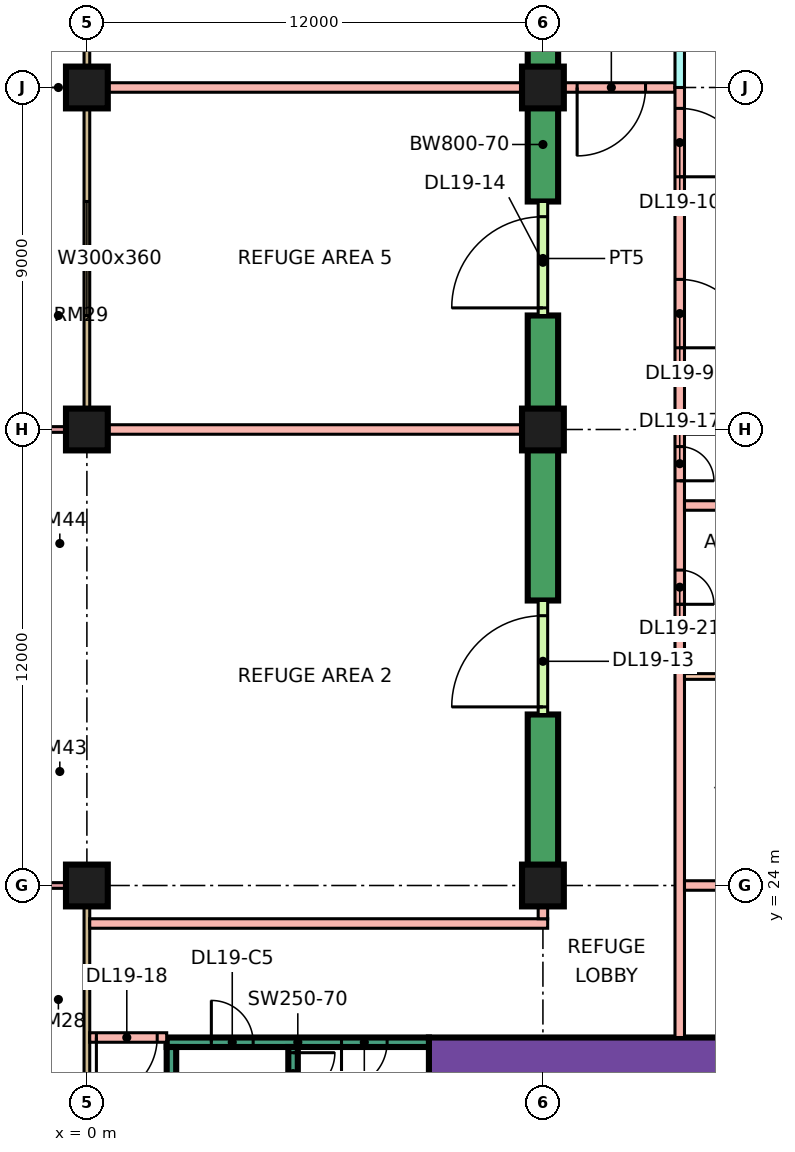
"""IFC4 building model, lengths in metres.
Left out: names, types, materials, properties, quantities, classifications, styles, units other than length and angle.
Written with IfcOpenShell. Run it as: python <this file> out.ifc"""

import sys

from ifc_helpers import new_model, si_unit, direction, frame, frame_2d, origin, origin_2d, place, context, subcontext, project, spatial, rectangle, extrude, element, fill, save


model = new_model("IFC4")
c1 = context("Model", 3, precision=1e-05, world=origin(), true_north=direction((0.0, 1.0)))
c2 = subcontext(c1, "Body", "Model", "MODEL_VIEW")
j1 = project(units=[si_unit("LENGTHUNIT", "METRE"), si_unit("PLANEANGLEUNIT", "RADIAN")], contexts=[c1])
p1 = place(None, origin())
s1 = spatial("IfcSite", under=j1, at=p1, CompositionType="ELEMENT")
p2 = place(p1, origin())
s2 = spatial("IfcBuilding", under=s1, at=p2, CompositionType="ELEMENT")
p3 = place(p2, frame((0.0, 0.0, 86.4)))
s3 = spatial("IfcBuildingStorey", under=s2, at=p3, CompositionType="ELEMENT", Elevation=86.4)
p4 = place(p3, frame((0.0, 24.0, 0.0), z_axis=(0.0, 0.0, 1.0), x_axis=(1.0, 0.0, 0.0)))
e1 = element("IfcColumn", 1, at=p4, inside=s3, PredefinedType="COLUMN", context=c2, shape_type="SweptSolid", body=[
    extrude(rectangle(XDim=1.1, YDim=1.1, at=origin_2d()), origin(), (0.0, 0.0, 1.0), 5.5),
])
p5 = place(p3, frame((0.0, 36.0, 0.0), z_axis=(0.0, 0.0, 1.0), x_axis=(1.0, 0.0, 0.0)))
e2 = element("IfcColumn", 2, at=p5, inside=s3, PredefinedType="COLUMN", context=c2, shape_type="SweptSolid", body=[
    extrude(rectangle(XDim=1.1, YDim=1.1, at=origin_2d()), origin(), (0.0, 0.0, 1.0), 5.5),
])
for number, where, z_axis, x_axis in (
    (3, (0.0, 45.0, 0.0), (0.0, 0.0, 1.0), (1.0, 0.0, 0.0)),
    (4, (12.0, 24.0, 0.0), (0.0, 0.0, 1.0), (1.0, 0.0, 0.0)),
    (5, (12.0, 36.0, 0.0), (0.0, 0.0, 1.0), (1.0, 0.0, 0.0)),
    (6, (12.0, 45.0, 0.0), (0.0, 0.0, 1.0), (1.0, 0.0, 0.0)),
):
    element("IfcColumn", number, at=place(p3, frame(where, z_axis=z_axis, x_axis=x_axis)), inside=s3, PredefinedType="COLUMN", context=c2, shape_type="SweptSolid", body=[
        extrude(rectangle(XDim=1.1, YDim=1.1, at=origin_2d()), origin(), (0.0, 0.0, 1.0), 5.5),
    ])
p6 = place(p3, frame((9.0, 19.45, 0.0), z_axis=(0.0, 0.0, 1.0), x_axis=(1.0, 0.0, 0.0)))
e7 = element("IfcWall", 7, at=p6, inside=s3, PredefinedType="SHEAR", context=c2, shape_type="SweptSolid", body=[
    extrude(rectangle(XDim=25.0, YDim=1.1, at=frame_2d((12.5, 0.0))), origin(), (0.0, 0.0, 1.0), 5.5),
])
p7 = place(p6, frame((19.1, 0.0, 0.0)))
e8 = element("IfcOpeningElement", 8, at=p7, cuts=e7, PredefinedType="OPENING", context=c2, shape_type="SweptSolid", body=[
    extrude(rectangle(XDim=1.8, YDim=2.4, at=frame_2d((0.9, 1.2))), frame((0.0, 0.56, 0.0), z_axis=(0.0, -1.0, 0.0), x_axis=(1.0, 0.0, 0.0)), (0.0, 0.0, 1.0), 1.12),
])
p8 = place(p3, frame((2.1, 19.875, 0.0), z_axis=(0.0, 0.0, 1.0), x_axis=(1.0, 0.0, 0.0)))
e9 = element("IfcWall", 9, at=p8, inside=s3, PredefinedType="SHEAR", context=c2, shape_type="SweptSolid", body=[
    extrude(rectangle(XDim=6.9, YDim=0.25, at=frame_2d((3.45, 0.0))), origin(), (0.0, 0.0, 1.0), 5.5),
])
p9 = place(p8, frame((1.175, 0.0, 0.0)))
e10 = element("IfcOpeningElement", 10, at=p9, cuts=e9, PredefinedType="OPENING", context=c2, shape_type="SweptSolid", body=[
    extrude(rectangle(XDim=1.1, YDim=2.2, at=frame_2d((0.55, 1.1))), frame((0.0, 0.135, 0.0), z_axis=(0.0, -1.0, 0.0), x_axis=(1.0, 0.0, 0.0)), (0.0, 0.0, 1.0), 0.27),
])
p10 = place(p8, frame((4.6, 0.0, 0.0)))
e11 = element("IfcOpeningElement", 11, at=p10, cuts=e9, PredefinedType="OPENING", context=c2, shape_type="SweptSolid", body=[
    extrude(rectangle(XDim=1.2, YDim=2.2, at=frame_2d((0.6, 1.1))), frame((0.0, 0.135, 0.0), z_axis=(0.0, -1.0, 0.0), x_axis=(1.0, 0.0, 0.0)), (0.0, 0.0, 1.0), 0.27),
])
p11 = place(p3, frame((2.225, 13.25, 0.0), z_axis=(0.0, 0.0, 1.0), x_axis=(0.0, 1.0, 0.0)))
e12 = element("IfcWall", 12, at=p11, inside=s3, PredefinedType="SHEAR", context=c2, shape_type="SweptSolid", body=[
    extrude(rectangle(XDim=6.5, YDim=0.25, at=frame_2d((3.25, 0.0))), origin(), (0.0, 0.0, 1.0), 5.5),
])
p12 = place(p3, frame((5.425, 13.25, 0.0), z_axis=(0.0, 0.0, 1.0), x_axis=(0.0, 1.0, 0.0)))
e13 = element("IfcWall", 13, at=p12, inside=s3, PredefinedType="SHEAR", context=c2, shape_type="SweptSolid", body=[
    extrude(rectangle(XDim=6.5, YDim=0.25, at=frame_2d((3.25, 0.0))), origin(), (0.0, 0.0, 1.0), 5.5),
])
p13 = place(p12, frame((5.25, 0.0, 0.0)))
e14 = element("IfcOpeningElement", 14, at=p13, cuts=e13, PredefinedType="OPENING", context=c2, shape_type="SweptSolid", body=[
    extrude(rectangle(XDim=1.1, YDim=2.2, at=frame_2d((0.55, 1.1))), frame((0.0, 0.135, 0.0), z_axis=(0.0, -1.0, 0.0), x_axis=(1.0, 0.0, 0.0)), (0.0, 0.0, 1.0), 0.27),
])
for number, where, z_axis, x_axis in (
    (15, (12.0, 24.0, 0.0), (0.0, 0.0, 1.0), (0.0, 1.0, 0.0)),
    (16, (12.0, 31.5, 0.0), (0.0, 0.0, 1.0), (0.0, 1.0, 0.0)),
):
    element("IfcWall", number, at=place(p3, frame(where, z_axis=z_axis, x_axis=x_axis)), inside=s3, PredefinedType="SHEAR", context=c2, shape_type="SweptSolid", body=[
        extrude(rectangle(XDim=4.5, YDim=0.8, at=frame_2d((2.25, 0.0))), origin(), (0.0, 0.0, 1.0), 5.1),
    ])
for number, where, z_axis, x_axis in (
    (17, (12.0, 36.0, 0.0), (0.0, 0.0, 1.0), (0.0, 1.0, 0.0)),
    (18, (12.0, 42.0, 0.0), (0.0, 0.0, 1.0), (0.0, 1.0, 0.0)),
    (19, (12.0, 45.0, 0.0), (0.0, 0.0, 1.0), (0.0, 1.0, 0.0)),
):
    element("IfcWall", number, at=place(p3, frame(where, z_axis=z_axis, x_axis=x_axis)), inside=s3, PredefinedType="SHEAR", context=c2, shape_type="SweptSolid", body=[
        extrude(rectangle(XDim=3.0, YDim=0.8, at=frame_2d((1.5, 0.0))), origin(), (0.0, 0.0, 1.0), 5.1),
    ])
p14 = place(p3, frame((0.0, 47.925, 0.0), z_axis=(0.0, 0.0, 1.0), x_axis=(0.0, -1.0, 0.0)))
e20 = element("IfcWall", 20, at=p14, inside=s3, PredefinedType="SOLIDWALL", context=c2, shape_type="SweptSolid", body=[
    extrude(rectangle(XDim=11.85, YDim=0.15, at=frame_2d((5.925, 0.0))), origin(), (0.0, 0.0, 1.0), 5.1),
])
p15 = place(p14, frame((5.925, 0.0, 0.45)))
e21 = element("IfcOpeningElement", 21, at=p15, cuts=e20, PredefinedType="OPENING", context=c2, shape_type="SweptSolid", body=[
    extrude(rectangle(XDim=3.0, YDim=3.6, at=frame_2d((1.5, 1.8))), frame((0.0, 0.085, 0.0), z_axis=(0.0, -1.0, 0.0), x_axis=(1.0, 0.0, 0.0)), (0.0, 0.0, 1.0), 0.17),
])
p16 = place(p3, frame((-1.5, 36.0, 0.0), z_axis=(0.0, 0.0, 1.0), x_axis=(1.0, 0.0, 0.0)))
e22 = element("IfcWall", 22, at=p16, inside=s3, PredefinedType="SOLIDWALL", context=c2, shape_type="SweptSolid", body=[
    extrude(rectangle(XDim=1.5, YDim=0.15, at=frame_2d((0.75, 0.0))), origin(), (0.0, 0.0, 1.0), 5.1),
])
p17 = place(p3, frame((0.0, 23.925, 0.0), z_axis=(0.0, 0.0, 1.0), x_axis=(0.0, -1.0, 0.0)))
e23 = element("IfcWall", 23, at=p17, inside=s3, PredefinedType="SOLIDWALL", context=c2, shape_type="SweptSolid", body=[
    extrude(rectangle(XDim=11.35, YDim=0.15, at=frame_2d((5.675, 0.0))), origin(), (0.0, 0.0, 1.0), 5.1),
])
p18 = place(p3, frame((-1.5, 24.0, 0.0), z_axis=(0.0, 0.0, 1.0), x_axis=(1.0, 0.0, 0.0)))
e24 = element("IfcWall", 24, at=p18, inside=s3, PredefinedType="SOLIDWALL", context=c2, shape_type="SweptSolid", body=[
    extrude(rectangle(XDim=1.5, YDim=0.15, at=frame_2d((0.75, 0.0))), origin(), (0.0, 0.0, 1.0), 5.1),
])
e25 = element("IfcWall", 25, at=p5, inside=s3, PredefinedType="PARTITIONING", context=c2, shape_type="SweptSolid", body=[
    extrude(rectangle(XDim=11.601, YDim=0.25, at=frame_2d((5.801, 0.0))), origin(), (0.0, 0.0, 1.0), 5.1),
])
p19 = place(p3, frame((0.074, 20.0, 0.0), z_axis=(0.0, 0.0, 1.0), x_axis=(1.0, 0.0, 0.0)))
e26 = element("IfcWall", 26, at=p19, inside=s3, PredefinedType="PARTITIONING", context=c2, shape_type="SweptSolid", body=[
    extrude(rectangle(XDim=2.026, YDim=0.25, at=frame_2d((1.013, 0.0))), origin(), (0.0, 0.0, 1.0), 5.1),
])
p20 = place(p19, frame((0.176, 0.0, 0.0)))
e27 = element("IfcOpeningElement", 27, at=p20, cuts=e26, PredefinedType="OPENING", context=c2, shape_type="SweptSolid", body=[
    extrude(rectangle(XDim=1.6, YDim=2.1, at=frame_2d((0.8, 1.05))), frame((0.0, 0.135, 0.0), z_axis=(0.0, -1.0, 0.0), x_axis=(1.0, 0.0, 0.0)), (0.0, 0.0, 1.0), 0.27),
])
p21 = place(p3, frame((0.074, 23.0, 0.0), z_axis=(0.0, 0.0, 1.0), x_axis=(1.0, 0.0, 0.0)))
e28 = element("IfcWall", 28, at=p21, inside=s3, PredefinedType="PARTITIONING", context=c2, shape_type="SweptSolid", body=[
    extrude(rectangle(XDim=12.051, YDim=0.25, at=frame_2d((6.025, 0.0))), origin(), (0.0, 0.0, 1.0), 5.1),
])
p22 = place(p3, frame((0.074, 45.0, 0.0), z_axis=(0.0, 0.0, 1.0), x_axis=(1.0, 0.0, 0.0)))
e29 = element("IfcWall", 29, at=p22, inside=s3, PredefinedType="PARTITIONING", context=c2, shape_type="SweptSolid", body=[
    extrude(rectangle(XDim=11.527, YDim=0.25, at=frame_2d((5.764, 0.0))), origin(), (0.0, 0.0, 1.0), 5.1),
])
p23 = place(p3, frame((12.0, 23.125, 0.0), z_axis=(0.0, 0.0, 1.0), x_axis=(0.0, 1.0, 0.0)))
e30 = element("IfcWall", 30, at=p23, inside=s3, PredefinedType="PARTITIONING", context=c2, shape_type="SweptSolid", body=[
    extrude(rectangle(XDim=0.876, YDim=0.25, at=frame_2d((0.438, 0.0))), origin(), (0.0, 0.0, 1.0), 5.1),
])
p24 = place(p3, frame((12.0, 28.499, 0.0), z_axis=(0.0, 0.0, 1.0), x_axis=(0.0, 1.0, 0.0)))
e31 = element("IfcWall", 31, at=p24, inside=s3, PredefinedType="PARTITIONING", context=c2, shape_type="SweptSolid", body=[
    extrude(rectangle(XDim=3.002, YDim=0.25, at=frame_2d((1.501, 0.0))), origin(), (0.0, 0.0, 1.0), 3.05),
])
p25 = place(p24, frame((0.201, 0.0, 0.0)))
e32 = element("IfcOpeningElement", 32, at=p25, cuts=e31, PredefinedType="OPENING", context=c2, shape_type="SweptSolid", body=[
    extrude(rectangle(XDim=2.4, YDim=2.1, at=frame_2d((1.2, 1.05))), frame((0.0, 0.135, 0.0), z_axis=(0.0, -1.0, 0.0), x_axis=(1.0, 0.0, 0.0)), (0.0, 0.0, 1.0), 0.27),
])
p26 = place(p3, frame((12.0, 38.999, 0.0), z_axis=(0.0, 0.0, 1.0), x_axis=(0.0, 1.0, 0.0)))
e33 = element("IfcWall", 33, at=p26, inside=s3, PredefinedType="PARTITIONING", context=c2, shape_type="SweptSolid", body=[
    extrude(rectangle(XDim=3.002, YDim=0.25, at=frame_2d((1.501, 0.0))), origin(), (0.0, 0.0, 1.0), 3.05),
])
p27 = place(p26, frame((0.201, 0.0, 0.0)))
e34 = element("IfcOpeningElement", 34, at=p27, cuts=e33, PredefinedType="OPENING", context=c2, shape_type="SweptSolid", body=[
    extrude(rectangle(XDim=2.4, YDim=2.1, at=frame_2d((1.2, 1.05))), frame((0.0, 0.135, 0.0), z_axis=(0.0, -1.0, 0.0), x_axis=(1.0, 0.0, 0.0)), (0.0, 0.0, 1.0), 0.27),
])
p28 = place(p3, frame((12.399, 45.0, 0.0), z_axis=(0.0, 0.0, 1.0), x_axis=(1.0, 0.0, 0.0)))
e35 = element("IfcWall", 35, at=p28, inside=s3, PredefinedType="PARTITIONING", context=c2, shape_type="SweptSolid", body=[
    extrude(rectangle(XDim=3.076, YDim=0.25, at=frame_2d((1.538, 0.0))), origin(), (0.0, 0.0, 1.0), 5.1),
])
p29 = place(p28, frame((0.501, 0.0, 0.0)))
e36 = element("IfcOpeningElement", 36, at=p29, cuts=e35, PredefinedType="OPENING", context=c2, shape_type="SweptSolid", body=[
    extrude(rectangle(XDim=1.8, YDim=2.1, at=frame_2d((0.9, 1.05))), frame((0.0, 0.135, 0.0), z_axis=(0.0, -1.0, 0.0), x_axis=(1.0, 0.0, 0.0)), (0.0, 0.0, 1.0), 0.27),
])
p30 = place(p3, frame((15.6, 20.0, 0.0), z_axis=(0.0, 0.0, 1.0), x_axis=(0.0, 1.0, 0.0)))
e37 = element("IfcWall", 37, at=p30, inside=s3, PredefinedType="PARTITIONING", context=c2, shape_type="SweptSolid", body=[
    extrude(rectangle(XDim=25.0, YDim=0.25, at=frame_2d((12.5, 0.0))), origin(), (0.0, 0.0, 1.0), 5.1),
])
p31 = place(p30, frame((18.15, 0.0, 0.0)))
e38 = element("IfcOpeningElement", 38, at=p31, cuts=e37, PredefinedType="OPENING", context=c2, shape_type="SweptSolid", body=[
    extrude(rectangle(XDim=1.8, YDim=2.1, at=frame_2d((0.9, 1.05))), frame((0.0, 0.135, 0.0), z_axis=(0.0, -1.0, 0.0), x_axis=(1.0, 0.0, 0.0)), (0.0, 0.0, 1.0), 0.27),
])
p32 = place(p30, frame((22.65, 0.0, 0.0)))
e39 = element("IfcOpeningElement", 39, at=p32, cuts=e37, PredefinedType="OPENING", context=c2, shape_type="SweptSolid", body=[
    extrude(rectangle(XDim=1.8, YDim=2.1, at=frame_2d((0.9, 1.05))), frame((0.0, 0.135, 0.0), z_axis=(0.0, -1.0, 0.0), x_axis=(1.0, 0.0, 0.0)), (0.0, 0.0, 1.0), 0.27),
])
p33 = place(p30, frame((14.65, 0.0, 0.0)))
e40 = element("IfcOpeningElement", 40, at=p33, cuts=e37, PredefinedType="OPENING", context=c2, shape_type="SweptSolid", body=[
    extrude(rectangle(XDim=0.9, YDim=2.1, at=frame_2d((0.45, 1.05))), frame((0.0, 0.135, 0.0), z_axis=(0.0, -1.0, 0.0), x_axis=(1.0, 0.0, 0.0)), (0.0, 0.0, 1.0), 0.27),
])
p34 = place(p30, frame((11.4, 0.0, 0.0)))
e41 = element("IfcOpeningElement", 41, at=p34, cuts=e37, PredefinedType="OPENING", context=c2, shape_type="SweptSolid", body=[
    extrude(rectangle(XDim=0.9, YDim=2.1, at=frame_2d((0.45, 1.05))), frame((0.0, 0.135, 0.0), z_axis=(0.0, -1.0, 0.0), x_axis=(1.0, 0.0, 0.0)), (0.0, 0.0, 1.0), 0.27),
])
p35 = place(p3, frame((15.6, 45.0, 0.0), z_axis=(0.0, 0.0, 1.0), x_axis=(0.0, 1.0, 0.0)))
e42 = element("IfcWall", 42, at=p35, inside=s3, PredefinedType="PARTITIONING", context=c2, shape_type="SweptSolid", body=[
    extrude(rectangle(XDim=2.775, YDim=0.25, at=frame_2d((1.387, 0.0))), origin(), (0.0, 0.0, 1.0), 5.1),
])
p36 = place(p3, frame((15.725, 24.0, 0.0), z_axis=(0.0, 0.0, 1.0), x_axis=(1.0, 0.0, 0.0)))
e43 = element("IfcWall", 43, at=p36, inside=s3, PredefinedType="PARTITIONING", context=c2, shape_type="SweptSolid", body=[
    extrude(rectangle(XDim=4.15, YDim=0.25, at=frame_2d((2.075, 0.0))), origin(), (0.0, 0.0, 1.0), 5.1),
])
p37 = place(p3, frame((15.725, 29.5, 0.0), z_axis=(0.0, 0.0, 1.0), x_axis=(1.0, 0.0, 0.0)))
e44 = element("IfcWall", 44, at=p37, inside=s3, PredefinedType="PARTITIONING", context=c2, shape_type="SweptSolid", body=[
    extrude(rectangle(XDim=4.15, YDim=0.15, at=frame_2d((2.075, 0.0))), origin(), (0.0, 0.0, 1.0), 5.1),
])
p38 = place(p3, frame((15.725, 34.0, 0.0), z_axis=(0.0, 0.0, 1.0), x_axis=(1.0, 0.0, 0.0)))
e45 = element("IfcWall", 45, at=p38, inside=s3, PredefinedType="PARTITIONING", context=c2, shape_type="SweptSolid", body=[
    extrude(rectangle(XDim=4.15, YDim=0.25, at=frame_2d((2.075, 0.0))), origin(), (0.0, 0.0, 1.0), 5.1),
])
p39 = place(p3, frame((15.725, 36.0, 0.0), z_axis=(0.0, 0.0, 1.0), x_axis=(1.0, 0.0, 0.0)))
e46 = element("IfcWall", 46, at=p39, inside=s3, PredefinedType="PARTITIONING", context=c2, shape_type="SweptSolid", body=[
    extrude(rectangle(XDim=8.275, YDim=0.25, at=frame_2d((4.137, 0.0))), origin(), (0.0, 0.0, 1.0), 5.1),
])
p40 = place(p3, frame((15.725, 42.0, 0.0), z_axis=(0.0, 0.0, 1.0), x_axis=(1.0, 0.0, 0.0)))
e47 = element("IfcWall", 47, at=p40, inside=s3, PredefinedType="PARTITIONING", context=c2, shape_type="SweptSolid", body=[
    extrude(rectangle(XDim=8.201, YDim=0.25, at=frame_2d((4.101, 0.0))), origin(), (0.0, 0.0, 1.0), 5.1),
])
p41 = place(p15, origin())
e48 = element("IfcWindow", 48, at=p41, inside=s3, PartitioningType="SINGLE_PANEL", PredefinedType="WINDOW", context=c2, shape_type="SweptSolid", body=[
    extrude(rectangle(XDim=3.0, YDim=3.6, at=frame_2d((1.5, 1.8))), frame((0.0, 0.03, 0.0), z_axis=(0.0, -1.0, 0.0), x_axis=(1.0, 0.0, 0.0)), (0.0, 0.0, 1.0), 0.06),
])
fill(e21, e48)
p42 = place(p13, origin())
e49 = element("IfcDoor", 49, at=p42, inside=s3, OperationType="SINGLE_SWING_RIGHT", PredefinedType="DOOR", context=c2, shape_type="SweptSolid", body=[
    extrude(rectangle(XDim=1.1, YDim=2.2, at=frame_2d((0.55, 1.1))), frame((0.0, 0.025, 0.0), z_axis=(0.0, -1.0, 0.0), x_axis=(1.0, 0.0, 0.0)), (0.0, 0.0, 1.0), 0.05),
])
fill(e14, e49)
p43 = place(p9, origin())
e50 = element("IfcDoor", 50, at=p43, inside=s3, OperationType="SINGLE_SWING_LEFT", PredefinedType="DOOR", context=c2, shape_type="SweptSolid", body=[
    extrude(rectangle(XDim=1.1, YDim=2.2, at=frame_2d((0.55, 1.1))), frame((0.0, 0.025, 0.0), z_axis=(0.0, -1.0, 0.0), x_axis=(1.0, 0.0, 0.0)), (0.0, 0.0, 1.0), 0.05),
])
fill(e10, e50)
p44 = place(p10, frame((1.2, 0.0, 0.0), z_axis=(0.0, 0.0, 1.0), x_axis=(-1.0, 0.0, 0.0)))
e51 = element("IfcDoor", 51, at=p44, inside=s3, OperationType="SINGLE_SWING_LEFT", PredefinedType="DOOR", context=c2, shape_type="SweptSolid", body=[
    extrude(rectangle(XDim=1.2, YDim=2.2, at=frame_2d((0.6, 1.1))), frame((0.0, 0.025, 0.0), z_axis=(0.0, -1.0, 0.0), x_axis=(1.0, 0.0, 0.0)), (0.0, 0.0, 1.0), 0.05),
])
fill(e11, e51)
p45 = place(p31, frame((1.8, 0.0, 0.0), z_axis=(0.0, 0.0, 1.0), x_axis=(-1.0, 0.0, 0.0)))
e52 = element("IfcDoor", 52, at=p45, inside=s3, OperationType="DOUBLE_DOOR_SINGLE_SWING", PredefinedType="DOOR", context=c2, shape_type="SweptSolid", body=[
    extrude(rectangle(XDim=1.8, YDim=2.1, at=frame_2d((0.9, 1.05))), frame((0.0, 0.025, 0.0), z_axis=(0.0, -1.0, 0.0), x_axis=(1.0, 0.0, 0.0)), (0.0, 0.0, 1.0), 0.05),
])
fill(e38, e52)
p46 = place(p32, frame((1.8, 0.0, 0.0), z_axis=(0.0, 0.0, 1.0), x_axis=(-1.0, 0.0, 0.0)))
e53 = element("IfcDoor", 53, at=p46, inside=s3, OperationType="DOUBLE_DOOR_SINGLE_SWING", PredefinedType="DOOR", context=c2, shape_type="SweptSolid", body=[
    extrude(rectangle(XDim=1.8, YDim=2.1, at=frame_2d((0.9, 1.05))), frame((0.0, 0.025, 0.0), z_axis=(0.0, -1.0, 0.0), x_axis=(1.0, 0.0, 0.0)), (0.0, 0.0, 1.0), 0.05),
])
fill(e39, e53)
p47 = place(p25, origin())
e54 = element("IfcDoor", 54, at=p47, inside=s3, OperationType="DOUBLE_DOOR_SINGLE_SWING", PredefinedType="DOOR", context=c2, shape_type="SweptSolid", body=[
    extrude(rectangle(XDim=2.4, YDim=2.1, at=frame_2d((1.2, 1.05))), frame((0.0, 0.025, 0.0), z_axis=(0.0, -1.0, 0.0), x_axis=(1.0, 0.0, 0.0)), (0.0, 0.0, 1.0), 0.05),
])
fill(e32, e54)
p48 = place(p27, origin())
e55 = element("IfcDoor", 55, at=p48, inside=s3, OperationType="DOUBLE_DOOR_SINGLE_SWING", PredefinedType="DOOR", context=c2, shape_type="SweptSolid", body=[
    extrude(rectangle(XDim=2.4, YDim=2.1, at=frame_2d((1.2, 1.05))), frame((0.0, 0.025, 0.0), z_axis=(0.0, -1.0, 0.0), x_axis=(1.0, 0.0, 0.0)), (0.0, 0.0, 1.0), 0.05),
])
fill(e34, e55)
p49 = place(p33, frame((0.9, 0.0, 0.0), z_axis=(0.0, 0.0, 1.0), x_axis=(-1.0, 0.0, 0.0)))
e56 = element("IfcDoor", 56, at=p49, inside=s3, OperationType="SINGLE_SWING_LEFT", PredefinedType="DOOR", context=c2, shape_type="SweptSolid", body=[
    extrude(rectangle(XDim=0.9, YDim=2.1, at=frame_2d((0.45, 1.05))), frame((0.0, 0.025, 0.0), z_axis=(0.0, -1.0, 0.0), x_axis=(1.0, 0.0, 0.0)), (0.0, 0.0, 1.0), 0.05),
])
fill(e40, e56)
p50 = place(p20, frame((1.6, 0.0, 0.0), z_axis=(0.0, 0.0, 1.0), x_axis=(-1.0, 0.0, 0.0)))
e57 = element("IfcDoor", 57, at=p50, inside=s3, OperationType="DOUBLE_DOOR_SINGLE_SWING", PredefinedType="DOOR", context=c2, shape_type="SweptSolid", body=[
    extrude(rectangle(XDim=1.6, YDim=2.1, at=frame_2d((0.8, 1.05))), frame((0.0, 0.025, 0.0), z_axis=(0.0, -1.0, 0.0), x_axis=(1.0, 0.0, 0.0)), (0.0, 0.0, 1.0), 0.05),
])
fill(e27, e57)
p51 = place(p29, frame((1.8, 0.0, 0.0), z_axis=(0.0, 0.0, 1.0), x_axis=(-1.0, 0.0, 0.0)))
e58 = element("IfcDoor", 58, at=p51, inside=s3, OperationType="DOUBLE_DOOR_SINGLE_SWING", PredefinedType="DOOR", context=c2, shape_type="SweptSolid", body=[
    extrude(rectangle(XDim=1.8, YDim=2.1, at=frame_2d((0.9, 1.05))), frame((0.0, 0.025, 0.0), z_axis=(0.0, -1.0, 0.0), x_axis=(1.0, 0.0, 0.0)), (0.0, 0.0, 1.0), 0.05),
])
fill(e36, e58)
p52 = place(p34, frame((0.9, 0.0, 0.0), z_axis=(0.0, 0.0, 1.0), x_axis=(-1.0, 0.0, 0.0)))
e59 = element("IfcDoor", 59, at=p52, inside=s3, OperationType="SINGLE_SWING_LEFT", PredefinedType="DOOR", context=c2, shape_type="SweptSolid", body=[
    extrude(rectangle(XDim=0.9, YDim=2.1, at=frame_2d((0.45, 1.05))), frame((0.0, 0.025, 0.0), z_axis=(0.0, -1.0, 0.0), x_axis=(1.0, 0.0, 0.0)), (0.0, 0.0, 1.0), 0.05),
])
fill(e41, e59)
save(model, sys.argv[1])
